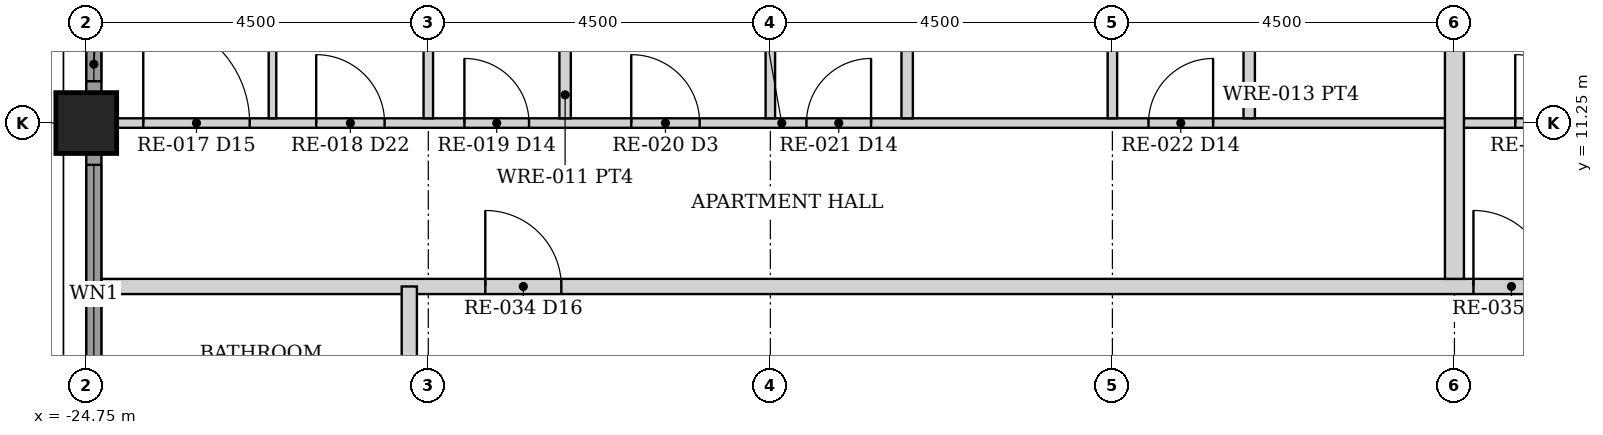
"""IFC4 building model, lengths in metres.
Left out: names, types, materials, properties, quantities, classifications, styles, units other than length and angle.
Written with IfcOpenShell. Run it as: python <this file> out.ifc"""

import sys

from ifc_helpers import new_model, si_unit, direction, frame, frame_2d, origin, origin_2d, place, context, subcontext, project, spatial, rectangle, hollow_rectangle, extrude, element, fill, save


model = new_model("IFC4")
c1 = context("Model", 3, precision=1e-05, world=origin(), true_north=direction((0.0, 1.0)))
c2 = subcontext(c1, "Body", "Model", "MODEL_VIEW")
j1 = project(units=[si_unit("LENGTHUNIT", "METRE"), si_unit("PLANEANGLEUNIT", "RADIAN")], contexts=[c1])
p1 = place(None, origin())
s1 = spatial("IfcSite", under=j1, at=p1, CompositionType="ELEMENT")
p2 = place(p1, origin())
s2 = spatial("IfcBuilding", under=s1, at=p2, CompositionType="ELEMENT")
p3 = place(p2, frame((0.0, 0.0, 68.5)))
s3 = spatial("IfcBuildingStorey", under=s2, at=p3, CompositionType="ELEMENT", Elevation=68.5)
p4 = place(p3, frame((-24.75, 11.25, 0.0), z_axis=(0.0, 0.0, 1.0), x_axis=(1.0, 0.0, 0.0)))
e1 = element("IfcColumn", 1, at=p4, inside=s3, PredefinedType="COLUMN", context=c2, shape_type="SweptSolid", body=[
    extrude(hollow_rectangle(XDim=0.8, YDim=0.8, WallThickness=0.06, at=origin_2d()), origin(), (0.0, 0.0, 1.0), 3.5),
])
p5 = place(p3, frame((-24.65, 7.155, 0.0), z_axis=(0.0, 0.0, 1.0), x_axis=(0.0, 1.0, 0.0)))
e2 = element("IfcWall", 2, at=p5, inside=s3, PredefinedType="SOLIDWALL", context=c2, shape_type="SweptSolid", body=[
    extrude(rectangle(XDim=3.69, YDim=0.2, at=frame_2d((1.845, 0.0))), origin(), (0.0, 0.0, 1.0), 2.379),
])
p6 = place(p5, frame((0.145, 0.0, 0.3)))
e3 = element("IfcOpeningElement", 3, at=p6, cuts=e2, PredefinedType="OPENING", context=c2, shape_type="SweptSolid", body=[
    extrude(rectangle(XDim=3.4, YDim=1.929, at=frame_2d((1.7, 0.964))), frame((0.0, 0.11, 0.0), z_axis=(0.0, -1.0, 0.0), x_axis=(1.0, 0.0, 0.0)), (0.0, 0.0, 1.0), 0.22),
])
p7 = place(p3, frame((-24.65, 11.655, 0.0), z_axis=(0.0, 0.0, 1.0), x_axis=(0.0, 1.0, 0.0)))
e4 = element("IfcWall", 4, at=p7, inside=s3, PredefinedType="SOLIDWALL", context=c2, shape_type="SweptSolid", body=[
    extrude(rectangle(XDim=3.69, YDim=0.2, at=frame_2d((1.845, 0.0))), origin(), (0.0, 0.0, 1.0), 2.379),
])
p8 = place(p7, frame((0.145, 0.0, 0.3)))
e5 = element("IfcOpeningElement", 5, at=p8, cuts=e4, PredefinedType="OPENING", context=c2, shape_type="SweptSolid", body=[
    extrude(rectangle(XDim=3.4, YDim=1.929, at=frame_2d((1.7, 0.964))), frame((0.0, 0.11, 0.0), z_axis=(0.0, -1.0, 0.0), x_axis=(1.0, 0.0, 0.0)), (0.0, 0.0, 1.0), 0.22),
])
p9 = place(p3, frame((-24.55, 9.1, 0.0), z_axis=(0.0, 0.0, 1.0), x_axis=(1.0, 0.0, 0.0)))
e6 = element("IfcWall", 6, at=p9, inside=s3, PredefinedType="PARTITIONING", context=c2, shape_type="SweptSolid", body=[
    extrude(rectangle(XDim=49.1, YDim=0.2, at=frame_2d((24.55, 0.0))), origin(), (0.0, 0.0, 1.0), 2.373),
])
p10 = place(p9, frame((5.05, 0.0, 0.0)))
e7 = element("IfcOpeningElement", 7, at=p10, cuts=e6, PredefinedType="OPENING", context=c2, shape_type="SweptSolid", body=[
    extrude(rectangle(XDim=1.0, YDim=2.3, at=frame_2d((0.5, 1.15))), frame((0.0, 0.11, 0.0), z_axis=(0.0, -1.0, 0.0), x_axis=(1.0, 0.0, 0.0)), (0.0, 0.0, 1.0), 0.22),
])
p11 = place(p9, frame((18.05, 0.0, 0.0)))
e8 = element("IfcOpeningElement", 8, at=p11, cuts=e6, PredefinedType="OPENING", context=c2, shape_type="SweptSolid", body=[
    extrude(rectangle(XDim=1.0, YDim=2.3, at=frame_2d((0.5, 1.15))), frame((0.0, 0.11, 0.0), z_axis=(0.0, -1.0, 0.0), x_axis=(1.0, 0.0, 0.0)), (0.0, 0.0, 1.0), 0.22),
])
p12 = place(p9, frame((43.05, 0.0, 0.0)))
e9 = element("IfcOpeningElement", 9, at=p12, cuts=e6, PredefinedType="OPENING", context=c2, shape_type="SweptSolid", body=[
    extrude(rectangle(XDim=1.0, YDim=2.3, at=frame_2d((0.5, 1.15))), frame((0.0, 0.11, 0.0), z_axis=(0.0, -1.0, 0.0), x_axis=(1.0, 0.0, 0.0)), (0.0, 0.0, 1.0), 0.22),
])
p13 = place(p3, frame((-20.5, -9.1, 0.0), z_axis=(0.0, 0.0, 1.0), x_axis=(0.0, 1.0, 0.0)))
e10 = element("IfcWall", 10, at=p13, inside=s3, PredefinedType="PARTITIONING", context=c2, shape_type="SweptSolid", body=[
    extrude(rectangle(XDim=18.2, YDim=0.2, at=frame_2d((9.1, 0.0))), origin(), (0.0, 0.0, 1.0), 2.373),
])
p14 = place(p13, frame((6.35, 0.0, 0.0)))
e11 = element("IfcOpeningElement", 11, at=p14, cuts=e10, PredefinedType="OPENING", context=c2, shape_type="SweptSolid", body=[
    extrude(rectangle(XDim=1.0, YDim=2.3, at=frame_2d((0.5, 1.15))), frame((0.0, 0.11, 0.0), z_axis=(0.0, -1.0, 0.0), x_axis=(1.0, 0.0, 0.0)), (0.0, 0.0, 1.0), 0.22),
])
p15 = place(p3, frame((-24.35, 11.25, 0.0), z_axis=(0.0, 0.0, 1.0), x_axis=(1.0, 0.0, 0.0)))
e12 = element("IfcWall", 12, at=p15, inside=s3, PredefinedType="PARTITIONING", context=c2, shape_type="SweptSolid", body=[
    extrude(rectangle(XDim=17.5, YDim=0.125, at=frame_2d((8.75, 0.0))), origin(), (0.0, 0.0, 1.0), 2.373),
])
p16 = place(p15, frame((2.625, 0.0, 0.0)))
e13 = element("IfcOpeningElement", 13, at=p16, cuts=e12, PredefinedType="OPENING", context=c2, shape_type="SweptSolid", body=[
    extrude(rectangle(XDim=0.9, YDim=2.1, at=frame_2d((0.45, 1.05))), frame((0.0, 0.073, 0.0), z_axis=(0.0, -1.0, 0.0), x_axis=(1.0, 0.0, 0.0)), (0.0, 0.0, 1.0), 0.145),
])
p17 = place(p15, frame((0.35, 0.0, 0.0)))
e14 = element("IfcOpeningElement", 14, at=p17, cuts=e12, PredefinedType="OPENING", context=c2, shape_type="SweptSolid", body=[
    extrude(rectangle(XDim=1.4, YDim=2.1, at=frame_2d((0.7, 1.05))), frame((0.0, 0.073, 0.0), z_axis=(0.0, -1.0, 0.0), x_axis=(1.0, 0.0, 0.0)), (0.0, 0.0, 1.0), 0.145),
])
p18 = place(p15, frame((4.575, 0.0, 0.0)))
e15 = element("IfcOpeningElement", 15, at=p18, cuts=e12, PredefinedType="OPENING", context=c2, shape_type="SweptSolid", body=[
    extrude(rectangle(XDim=0.85, YDim=2.1, at=frame_2d((0.425, 1.05))), frame((0.0, 0.073, 0.0), z_axis=(0.0, -1.0, 0.0), x_axis=(1.0, 0.0, 0.0)), (0.0, 0.0, 1.0), 0.145),
])
p19 = place(p15, frame((6.77, 0.0, 0.0)))
e16 = element("IfcOpeningElement", 16, at=p19, cuts=e12, PredefinedType="OPENING", context=c2, shape_type="SweptSolid", body=[
    extrude(rectangle(XDim=0.9, YDim=2.1, at=frame_2d((0.45, 1.05))), frame((0.0, 0.073, 0.0), z_axis=(0.0, -1.0, 0.0), x_axis=(1.0, 0.0, 0.0)), (0.0, 0.0, 1.0), 0.145),
])
p20 = place(p15, frame((9.075, 0.0, 0.0)))
e17 = element("IfcOpeningElement", 17, at=p20, cuts=e12, PredefinedType="OPENING", context=c2, shape_type="SweptSolid", body=[
    extrude(rectangle(XDim=0.85, YDim=2.1, at=frame_2d((0.425, 1.05))), frame((0.0, 0.073, 0.0), z_axis=(0.0, -1.0, 0.0), x_axis=(1.0, 0.0, 0.0)), (0.0, 0.0, 1.0), 0.145),
])
p21 = place(p15, frame((13.575, 0.0, 0.0)))
e18 = element("IfcOpeningElement", 18, at=p21, cuts=e12, PredefinedType="OPENING", context=c2, shape_type="SweptSolid", body=[
    extrude(rectangle(XDim=0.85, YDim=2.1, at=frame_2d((0.425, 1.05))), frame((0.0, 0.073, 0.0), z_axis=(0.0, -1.0, 0.0), x_axis=(1.0, 0.0, 0.0)), (0.0, 0.0, 1.0), 0.145),
])
p22 = place(p3, frame((-22.3, 11.312, 0.0), z_axis=(0.0, 0.0, 1.0), x_axis=(0.0, 1.0, 0.0)))
e19 = element("IfcWall", 19, at=p22, inside=s3, PredefinedType="PARTITIONING", context=c2, shape_type="SweptSolid", body=[
    extrude(rectangle(XDim=5.25, YDim=0.1, at=frame_2d((2.625, 0.0))), origin(), (0.0, 0.0, 1.0), 2.373),
])
p23 = place(p3, frame((-20.25, 11.312, 0.0), z_axis=(0.0, 0.0, 1.0), x_axis=(0.0, 1.0, 0.0)))
e20 = element("IfcWall", 20, at=p23, inside=s3, PredefinedType="PARTITIONING", context=c2, shape_type="SweptSolid", body=[
    extrude(rectangle(XDim=13.038, YDim=0.125, at=frame_2d((6.519, 0.0))), origin(), (0.0, 0.0, 1.0), 2.373),
])
p24 = place(p3, frame((-18.45, 11.312, 0.0), z_axis=(0.0, 0.0, 1.0), x_axis=(0.0, 1.0, 0.0)))
e21 = element("IfcWall", 21, at=p24, inside=s3, PredefinedType="PARTITIONING", context=c2, shape_type="SweptSolid", body=[
    extrude(rectangle(XDim=3.087, YDim=0.15, at=frame_2d((1.544, 0.0))), origin(), (0.0, 0.0, 1.0), 2.373),
])
p25 = place(p24, frame((1.087, 0.0, 0.0)))
e22 = element("IfcOpeningElement", 22, at=p25, cuts=e21, PredefinedType="OPENING", context=c2, shape_type="SweptSolid", body=[
    extrude(rectangle(XDim=0.8, YDim=2.1, at=frame_2d((0.4, 1.05))), frame((0.0, 0.085, 0.0), z_axis=(0.0, -1.0, 0.0), x_axis=(1.0, 0.0, 0.0)), (0.0, 0.0, 1.0), 0.17),
])
p26 = place(p3, frame((-15.75, 11.312, 0.0), z_axis=(0.0, 0.0, 1.0), x_axis=(0.0, 1.0, 0.0)))
e23 = element("IfcWall", 23, at=p26, inside=s3, PredefinedType="PARTITIONING", context=c2, shape_type="SweptSolid", body=[
    extrude(rectangle(XDim=13.038, YDim=0.125, at=frame_2d((6.519, 0.0))), origin(), (0.0, 0.0, 1.0), 2.373),
])
p27 = place(p3, frame((-13.95, 11.312, 0.0), z_axis=(0.0, 0.0, 1.0), x_axis=(0.0, 1.0, 0.0)))
e24 = element("IfcWall", 24, at=p27, inside=s3, PredefinedType="PARTITIONING", context=c2, shape_type="SweptSolid", body=[
    extrude(rectangle(XDim=3.087, YDim=0.15, at=frame_2d((1.544, 0.0))), origin(), (0.0, 0.0, 1.0), 2.373),
])
p28 = place(p27, frame((1.087, 0.0, 0.0)))
e25 = element("IfcOpeningElement", 25, at=p28, cuts=e24, PredefinedType="OPENING", context=c2, shape_type="SweptSolid", body=[
    extrude(rectangle(XDim=0.8, YDim=2.1, at=frame_2d((0.4, 1.05))), frame((0.0, 0.085, 0.0), z_axis=(0.0, -1.0, 0.0), x_axis=(1.0, 0.0, 0.0)), (0.0, 0.0, 1.0), 0.17),
])
p29 = place(p3, frame((-11.25, 11.312, 0.0), z_axis=(0.0, 0.0, 1.0), x_axis=(0.0, 1.0, 0.0)))
e26 = element("IfcWall", 26, at=p29, inside=s3, PredefinedType="PARTITIONING", context=c2, shape_type="SweptSolid", body=[
    extrude(rectangle(XDim=13.038, YDim=0.125, at=frame_2d((6.519, 0.0))), origin(), (0.0, 0.0, 1.0), 2.373),
])
p30 = place(p3, frame((-9.45, 11.312, 0.0), z_axis=(0.0, 0.0, 1.0), x_axis=(0.0, 1.0, 0.0)))
e27 = element("IfcWall", 27, at=p30, inside=s3, PredefinedType="PARTITIONING", context=c2, shape_type="SweptSolid", body=[
    extrude(rectangle(XDim=3.087, YDim=0.15, at=frame_2d((1.544, 0.0))), origin(), (0.0, 0.0, 1.0), 2.373),
])
p31 = place(p30, frame((1.087, 0.0, 0.0)))
e28 = element("IfcOpeningElement", 28, at=p31, cuts=e27, PredefinedType="OPENING", context=c2, shape_type="SweptSolid", body=[
    extrude(rectangle(XDim=0.8, YDim=2.1, at=frame_2d((0.4, 1.05))), frame((0.0, 0.085, 0.0), z_axis=(0.0, -1.0, 0.0), x_axis=(1.0, 0.0, 0.0)), (0.0, 0.0, 1.0), 0.17),
])
p32 = place(p3, frame((-6.65, 11.25, 0.0), z_axis=(0.0, 0.0, 1.0), x_axis=(1.0, 0.0, 0.0)))
e29 = element("IfcWall", 29, at=p32, inside=s3, PredefinedType="PARTITIONING", context=c2, shape_type="SweptSolid", body=[
    extrude(rectangle(XDim=13.3, YDim=0.125, at=frame_2d((6.65, 0.0))), origin(), (0.0, 0.0, 1.0), 2.373),
])
p33 = place(p32, frame((0.7, 0.0, 0.0)))
e30 = element("IfcOpeningElement", 30, at=p33, cuts=e29, PredefinedType="OPENING", context=c2, shape_type="SweptSolid", body=[
    extrude(rectangle(XDim=0.9, YDim=2.1, at=frame_2d((0.45, 1.05))), frame((0.0, 0.073, 0.0), z_axis=(0.0, -1.0, 0.0), x_axis=(1.0, 0.0, 0.0)), (0.0, 0.0, 1.0), 0.145),
])
p34 = place(p32, frame((2.7, 0.0, 0.0)))
e31 = element("IfcOpeningElement", 31, at=p34, cuts=e29, PredefinedType="OPENING", context=c2, shape_type="SweptSolid", body=[
    extrude(rectangle(XDim=1.4, YDim=2.1, at=frame_2d((0.7, 1.05))), frame((0.0, 0.073, 0.0), z_axis=(0.0, -1.0, 0.0), x_axis=(1.0, 0.0, 0.0)), (0.0, 0.0, 1.0), 0.145),
])
p35 = place(p32, frame((4.875, 0.0, 0.0)))
e32 = element("IfcOpeningElement", 32, at=p35, cuts=e29, PredefinedType="OPENING", context=c2, shape_type="SweptSolid", body=[
    extrude(rectangle(XDim=0.85, YDim=2.1, at=frame_2d((0.425, 1.05))), frame((0.0, 0.073, 0.0), z_axis=(0.0, -1.0, 0.0), x_axis=(1.0, 0.0, 0.0)), (0.0, 0.0, 1.0), 0.145),
])
p36 = place(p32, frame((7.07, 0.0, 0.0)))
e33 = element("IfcOpeningElement", 33, at=p36, cuts=e29, PredefinedType="OPENING", context=c2, shape_type="SweptSolid", body=[
    extrude(rectangle(XDim=0.9, YDim=2.1, at=frame_2d((0.45, 1.05))), frame((0.0, 0.073, 0.0), z_axis=(0.0, -1.0, 0.0), x_axis=(1.0, 0.0, 0.0)), (0.0, 0.0, 1.0), 0.145),
])
p37 = place(p32, frame((9.375, 0.0, 0.0)))
e34 = element("IfcOpeningElement", 34, at=p37, cuts=e29, PredefinedType="OPENING", context=c2, shape_type="SweptSolid", body=[
    extrude(rectangle(XDim=0.85, YDim=2.1, at=frame_2d((0.425, 1.05))), frame((0.0, 0.073, 0.0), z_axis=(0.0, -1.0, 0.0), x_axis=(1.0, 0.0, 0.0)), (0.0, 0.0, 1.0), 0.145),
])
p38 = place(p3, frame((-6.75, 9.2, 0.0), z_axis=(0.0, 0.0, 1.0), x_axis=(0.0, 1.0, 0.0)))
e35 = element("IfcWall", 35, at=p38, inside=s3, PredefinedType="PARTITIONING", context=c2, shape_type="SweptSolid", body=[
    extrude(rectangle(XDim=15.15, YDim=0.25, at=frame_2d((7.575, 0.0))), origin(), (0.0, 0.0, 1.0), 2.373),
])
p39 = place(p6, origin())
e36 = element("IfcWindow", 36, at=p39, inside=s3, PartitioningType="SINGLE_PANEL", PredefinedType="WINDOW", context=c2, shape_type="SweptSolid", body=[
    extrude(rectangle(XDim=3.4, YDim=1.929, at=frame_2d((1.7, 0.964))), frame((0.0, 0.03, 0.0), z_axis=(0.0, -1.0, 0.0), x_axis=(1.0, 0.0, 0.0)), (0.0, 0.0, 1.0), 0.06),
])
fill(e3, e36)
p40 = place(p8, origin())
e37 = element("IfcWindow", 37, at=p40, inside=s3, PartitioningType="SINGLE_PANEL", PredefinedType="WINDOW", context=c2, shape_type="SweptSolid", body=[
    extrude(rectangle(XDim=3.4, YDim=1.929, at=frame_2d((1.7, 0.964))), frame((0.0, 0.03, 0.0), z_axis=(0.0, -1.0, 0.0), x_axis=(1.0, 0.0, 0.0)), (0.0, 0.0, 1.0), 0.06),
])
fill(e5, e37)
p41 = place(p10, origin())
e38 = element("IfcDoor", 38, at=p41, inside=s3, OperationType="SINGLE_SWING_LEFT", PredefinedType="DOOR", context=c2, shape_type="SweptSolid", body=[
    extrude(rectangle(XDim=1.0, YDim=2.3, at=frame_2d((0.5, 1.15))), frame((0.0, 0.025, 0.0), z_axis=(0.0, -1.0, 0.0), x_axis=(1.0, 0.0, 0.0)), (0.0, 0.0, 1.0), 0.05),
])
fill(e7, e38)
p42 = place(p16, origin())
e39 = element("IfcDoor", 39, at=p42, inside=s3, OperationType="SINGLE_SWING_LEFT", PredefinedType="DOOR", context=c2, shape_type="SweptSolid", body=[
    extrude(rectangle(XDim=0.9, YDim=2.1, at=frame_2d((0.45, 1.05))), frame((0.0, 0.025, 0.0), z_axis=(0.0, -1.0, 0.0), x_axis=(1.0, 0.0, 0.0)), (0.0, 0.0, 1.0), 0.05),
])
fill(e13, e39)
p43 = place(p17, origin())
e40 = element("IfcDoor", 40, at=p43, inside=s3, OperationType="SINGLE_SWING_LEFT", PredefinedType="DOOR", context=c2, shape_type="SweptSolid", body=[
    extrude(rectangle(XDim=1.4, YDim=2.1, at=frame_2d((0.7, 1.05))), frame((0.0, 0.025, 0.0), z_axis=(0.0, -1.0, 0.0), x_axis=(1.0, 0.0, 0.0)), (0.0, 0.0, 1.0), 0.05),
])
fill(e14, e40)
p44 = place(p18, origin())
e41 = element("IfcDoor", 41, at=p44, inside=s3, OperationType="SINGLE_SWING_LEFT", PredefinedType="DOOR", context=c2, shape_type="SweptSolid", body=[
    extrude(rectangle(XDim=0.85, YDim=2.1, at=frame_2d((0.425, 1.05))), frame((0.0, 0.025, 0.0), z_axis=(0.0, -1.0, 0.0), x_axis=(1.0, 0.0, 0.0)), (0.0, 0.0, 1.0), 0.05),
])
fill(e15, e41)
p45 = place(p19, origin())
e42 = element("IfcDoor", 42, at=p45, inside=s3, OperationType="SINGLE_SWING_LEFT", PredefinedType="DOOR", context=c2, shape_type="SweptSolid", body=[
    extrude(rectangle(XDim=0.9, YDim=2.1, at=frame_2d((0.45, 1.05))), frame((0.0, 0.025, 0.0), z_axis=(0.0, -1.0, 0.0), x_axis=(1.0, 0.0, 0.0)), (0.0, 0.0, 1.0), 0.05),
])
fill(e16, e42)
p46 = place(p20, origin())
e43 = element("IfcDoor", 43, at=p46, inside=s3, OperationType="SINGLE_SWING_RIGHT", PredefinedType="DOOR", context=c2, shape_type="SweptSolid", body=[
    extrude(rectangle(XDim=0.85, YDim=2.1, at=frame_2d((0.425, 1.05))), frame((0.0, 0.025, 0.0), z_axis=(0.0, -1.0, 0.0), x_axis=(1.0, 0.0, 0.0)), (0.0, 0.0, 1.0), 0.05),
])
fill(e17, e43)
p47 = place(p21, origin())
e44 = element("IfcDoor", 44, at=p47, inside=s3, OperationType="SINGLE_SWING_RIGHT", PredefinedType="DOOR", context=c2, shape_type="SweptSolid", body=[
    extrude(rectangle(XDim=0.85, YDim=2.1, at=frame_2d((0.425, 1.05))), frame((0.0, 0.025, 0.0), z_axis=(0.0, -1.0, 0.0), x_axis=(1.0, 0.0, 0.0)), (0.0, 0.0, 1.0), 0.05),
])
fill(e18, e44)
p48 = place(p11, origin())
e45 = element("IfcDoor", 45, at=p48, inside=s3, OperationType="SINGLE_SWING_LEFT", PredefinedType="DOOR", context=c2, shape_type="SweptSolid", body=[
    extrude(rectangle(XDim=1.0, YDim=2.3, at=frame_2d((0.5, 1.15))), frame((0.0, 0.025, 0.0), z_axis=(0.0, -1.0, 0.0), x_axis=(1.0, 0.0, 0.0)), (0.0, 0.0, 1.0), 0.05),
])
fill(e8, e45)
p49 = place(p33, origin())
e46 = element("IfcDoor", 46, at=p49, inside=s3, OperationType="SINGLE_SWING_LEFT", PredefinedType="DOOR", context=c2, shape_type="SweptSolid", body=[
    extrude(rectangle(XDim=0.9, YDim=2.1, at=frame_2d((0.45, 1.05))), frame((0.0, 0.025, 0.0), z_axis=(0.0, -1.0, 0.0), x_axis=(1.0, 0.0, 0.0)), (0.0, 0.0, 1.0), 0.05),
])
fill(e30, e46)
save(model, sys.argv[1])
